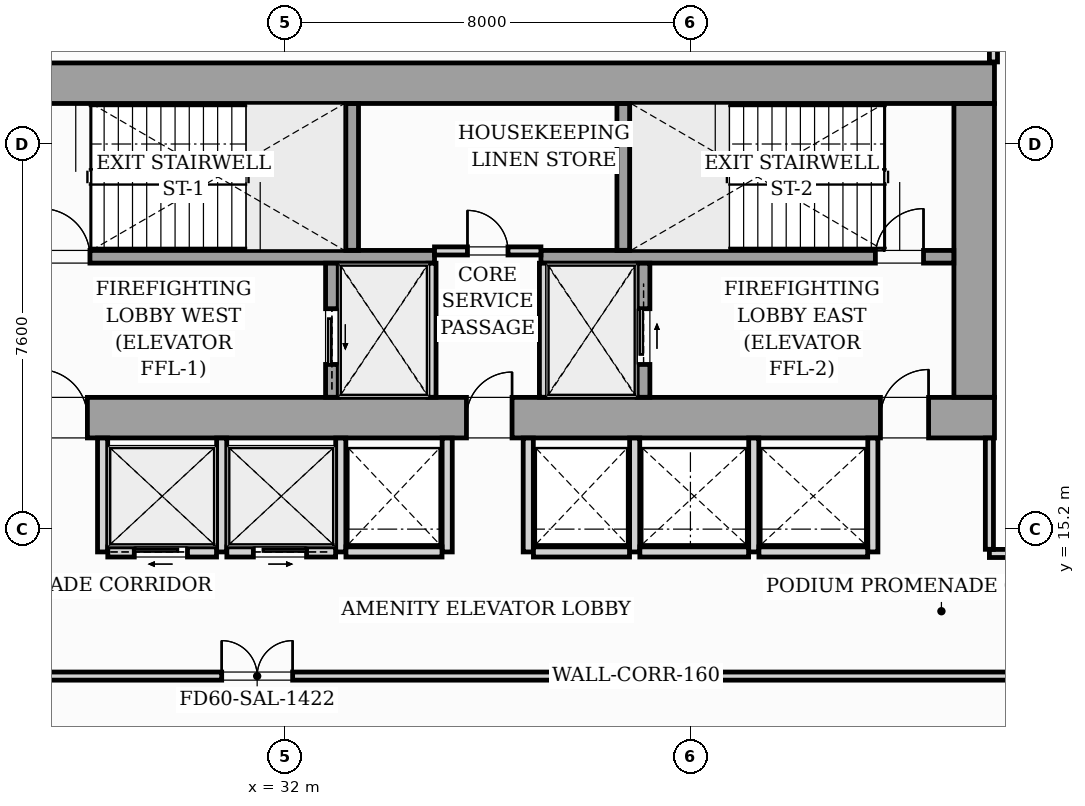
"""IFC4 building model, lengths in metres.
Left out: names, types, materials, properties, quantities, classifications, styles, units other than length and angle.
Written with IfcOpenShell. Run it as: python <this file> out.ifc"""

import sys

from ifc_helpers import new_model, si_unit, direction, frame, frame_2d, origin, origin_2d, place, context, subcontext, project, spatial, rectangle, i_section, extrude, source, transform, mapped, element, fill, save


model = new_model("IFC4")
c1 = context("Model", 3, precision=1e-05, world=origin(), true_north=direction((0.0, 1.0)))
c2 = subcontext(c1, "Body", "Model", "MODEL_VIEW")
j1 = project(units=[si_unit("LENGTHUNIT", "METRE"), si_unit("PLANEANGLEUNIT", "RADIAN")], contexts=[c1])
p1 = place(None, origin())
s1 = spatial("IfcSite", under=j1, at=p1, CompositionType="ELEMENT")
p2 = place(p1, origin())
s2 = spatial("IfcBuilding", under=s1, at=p2, CompositionType="ELEMENT")
p3 = place(p2, frame((0.0, 0.0, 9.5)))
s3 = spatial("IfcBuildingStorey", under=s2, at=p3, CompositionType="ELEMENT", Elevation=9.5)
m1 = source(origin(), c2, "Body", "SweptSolid", [
    extrude(i_section(OverallWidth=0.437, OverallDepth=0.514, WebThickness=0.061, FlangeThickness=0.097, FilletRadius=0.018, at=origin_2d()), origin(), (0.0, 0.0, 1.0), 4.496),
])
for number, where, z_axis, x_axis in (
    (1, (33.12, 17.4, 0.002), (0.0, 0.0, 1.0), (1.0, 0.0, 0.0)),
    (2, (38.88, 17.4, 0.002), (0.0, 0.0, 1.0), (1.0, 0.0, 0.0)),
    (3, (45.6, 17.4, 0.002), (0.0, 0.0, 1.0), (1.0, 0.0, 0.0)),
    (4, (33.12, 24.0, 0.002), (0.0, 0.0, 1.0), (1.0, 0.0, 0.0)),
    (5, (38.88, 24.0, 0.002), (0.0, 0.0, 1.0), (1.0, 0.0, 0.0)),
    (6, (45.6, 24.0, 0.002), (0.0, 0.0, 1.0), (1.0, 0.0, 0.0)),
):
    element("IfcColumn", number, at=place(p3, frame(where, z_axis=z_axis, x_axis=x_axis)), inside=s3, PredefinedType="PILASTER", context=c2, shape_type="MappedRepresentation", body=[
        mapped(m1, transform((0.0, 0.0, 0.0), scale=1.0)),
    ])
p4 = place(p3, frame((26.0, 17.4, 0.0), z_axis=(0.0, 0.0, 1.0), x_axis=(1.0, 0.0, 0.0)))
e7 = element("IfcWall", 7, at=p4, inside=s3, PredefinedType="SHEAR", context=c2, shape_type="SweptSolid", body=[
    extrude(rectangle(XDim=20.0, YDim=0.8, at=frame_2d((10.0, 0.0))), origin(), (0.0, 0.0, 1.0), 4.5),
])
p5 = place(p4, frame((1.15, 0.0, 0.0)))
e8 = element("IfcOpeningElement", 8, at=p5, cuts=e7, PredefinedType="OPENING", context=c2, shape_type="SweptSolid", body=[
    extrude(rectangle(XDim=0.95, YDim=2.06, at=frame_2d((0.475, 1.03))), frame((0.0, 0.41, 0.0), z_axis=(0.0, -1.0, 0.0), x_axis=(1.0, 0.0, 0.0)), (0.0, 0.0, 1.0), 0.82),
])
p6 = place(p4, frame((9.58, 0.0, 0.0)))
e9 = element("IfcOpeningElement", 9, at=p6, cuts=e7, PredefinedType="OPENING", context=c2, shape_type="SweptSolid", body=[
    extrude(rectangle(XDim=0.9, YDim=2.06, at=frame_2d((0.45, 1.03))), frame((0.0, 0.41, 0.0), z_axis=(0.0, -1.0, 0.0), x_axis=(1.0, 0.0, 0.0)), (0.0, 0.0, 1.0), 0.82),
])
p7 = place(p4, frame((17.75, 0.0, 0.0)))
e10 = element("IfcOpeningElement", 10, at=p7, cuts=e7, PredefinedType="OPENING", context=c2, shape_type="SweptSolid", body=[
    extrude(rectangle(XDim=0.95, YDim=2.06, at=frame_2d((0.475, 1.03))), frame((0.0, 0.41, 0.0), z_axis=(0.0, -1.0, 0.0), x_axis=(1.0, 0.0, 0.0)), (0.0, 0.0, 1.0), 0.82),
])
p8 = place(p3, frame((26.0, 24.0, 0.0), z_axis=(0.0, 0.0, 1.0), x_axis=(1.0, 0.0, 0.0)))
e11 = element("IfcWall", 11, at=p8, inside=s3, PredefinedType="SHEAR", context=c2, shape_type="SweptSolid", body=[
    extrude(rectangle(XDim=20.0, YDim=0.8, at=frame_2d((10.0, 0.0))), origin(), (0.0, 0.0, 1.0), 4.5),
])
p9 = place(p3, frame((45.6, 17.802, 0.0), z_axis=(0.0, 0.0, 1.0), x_axis=(0.0, 1.0, 0.0)))
e12 = element("IfcWall", 12, at=p9, inside=s3, PredefinedType="SHEAR", context=c2, shape_type="SweptSolid", body=[
    extrude(rectangle(XDim=5.796, YDim=0.8, at=frame_2d((2.898, 0.0))), origin(), (0.0, 0.0, 1.0), 4.5),
])
p10 = place(p3, frame((26.802, 20.575, 0.0), z_axis=(0.0, 0.0, 1.0), x_axis=(1.0, 0.0, 0.0)))
e13 = element("IfcWall", 13, at=p10, inside=s3, PredefinedType="SOLIDWALL", context=c2, shape_type="SweptSolid", body=[
    extrude(rectangle(XDim=8.148, YDim=0.25, at=frame_2d((4.074, 0.0))), origin(), (0.0, 0.0, 1.0), 4.5),
])
p11 = place(p10, frame((0.398, 0.0, 0.0)))
e14 = element("IfcOpeningElement", 14, at=p11, cuts=e13, PredefinedType="OPENING", context=c2, shape_type="SweptSolid", body=[
    extrude(rectangle(XDim=0.95, YDim=2.06, at=frame_2d((0.475, 1.03))), frame((0.0, 0.135, 0.0), z_axis=(0.0, -1.0, 0.0), x_axis=(1.0, 0.0, 0.0)), (0.0, 0.0, 1.0), 0.27),
])
p12 = place(p3, frame((37.05, 20.575, 0.0), z_axis=(0.0, 0.0, 1.0), x_axis=(1.0, 0.0, 0.0)))
e15 = element("IfcWall", 15, at=p12, inside=s3, PredefinedType="SOLIDWALL", context=c2, shape_type="SweptSolid", body=[
    extrude(rectangle(XDim=8.148, YDim=0.25, at=frame_2d((4.074, 0.0))), origin(), (0.0, 0.0, 1.0), 4.5),
])
p13 = place(p12, frame((6.6, 0.0, 0.0)))
e16 = element("IfcOpeningElement", 16, at=p13, cuts=e15, PredefinedType="OPENING", context=c2, shape_type="SweptSolid", body=[
    extrude(rectangle(XDim=0.95, YDim=2.06, at=frame_2d((0.475, 1.03))), frame((0.0, 0.135, 0.0), z_axis=(0.0, -1.0, 0.0), x_axis=(1.0, 0.0, 0.0)), (0.0, 0.0, 1.0), 0.27),
])
for number, where, z_axis, x_axis in (
    (17, (33.325, 20.702, 0.0), (0.0, 0.0, 1.0), (0.0, 1.0, 0.0)),
    (18, (38.675, 20.702, 0.0), (0.0, 0.0, 1.0), (0.0, 1.0, 0.0)),
):
    element("IfcWall", number, at=place(p3, frame(where, z_axis=z_axis, x_axis=x_axis)), inside=s3, PredefinedType="SOLIDWALL", context=c2, shape_type="SweptSolid", body=[
        extrude(rectangle(XDim=2.896, YDim=0.25, at=frame_2d((1.448, 0.0))), origin(), (0.0, 0.0, 1.0), 4.5),
    ])
p14 = place(p3, frame((32.925, 17.802, 0.0), z_axis=(0.0, 0.0, 1.0), x_axis=(0.0, 1.0, 0.0)))
e19 = element("IfcWall", 19, at=p14, inside=s3, PredefinedType="SOLIDWALL", context=c2, shape_type="SweptSolid", body=[
    extrude(rectangle(XDim=2.646, YDim=0.25, at=frame_2d((1.323, 0.0))), origin(), (0.0, 0.0, 1.0), 4.5),
])
p15 = place(p14, frame((0.648, 0.0, 0.0)))
e20 = element("IfcOpeningElement", 20, at=p15, cuts=e19, PredefinedType="OPENING", context=c2, shape_type="SweptSolid", body=[
    extrude(rectangle(XDim=1.1, YDim=2.08, at=frame_2d((0.55, 1.04))), frame((0.0, 0.135, 0.0), z_axis=(0.0, -1.0, 0.0), x_axis=(1.0, 0.0, 0.0)), (0.0, 0.0, 1.0), 0.27),
])
for number, where, z_axis, x_axis in (
    (21, (34.9, 17.802, 0.0), (0.0, 0.0, 1.0), (0.0, 1.0, 0.0)),
    (22, (37.1, 17.802, 0.0), (0.0, 0.0, 1.0), (0.0, 1.0, 0.0)),
):
    element("IfcWall", number, at=place(p3, frame(where, z_axis=z_axis, x_axis=x_axis)), inside=s3, PredefinedType="PARTITIONING", context=c2, shape_type="SweptSolid", body=[
        extrude(rectangle(XDim=2.646, YDim=0.16, at=frame_2d((1.323, 0.0))), origin(), (0.0, 0.0, 1.0), 4.08),
    ])
p16 = place(p3, frame((39.075, 17.802, 0.0), z_axis=(0.0, 0.0, 1.0), x_axis=(0.0, 1.0, 0.0)))
e23 = element("IfcWall", 23, at=p16, inside=s3, PredefinedType="SOLIDWALL", context=c2, shape_type="SweptSolid", body=[
    extrude(rectangle(XDim=2.646, YDim=0.25, at=frame_2d((1.323, 0.0))), origin(), (0.0, 0.0, 1.0), 4.5),
])
p17 = place(p16, frame((0.648, 0.0, 0.0)))
e24 = element("IfcOpeningElement", 24, at=p17, cuts=e23, PredefinedType="OPENING", context=c2, shape_type="SweptSolid", body=[
    extrude(rectangle(XDim=1.1, YDim=2.08, at=frame_2d((0.55, 1.04))), frame((0.0, 0.135, 0.0), z_axis=(0.0, -1.0, 0.0), x_axis=(1.0, 0.0, 0.0)), (0.0, 0.0, 1.0), 0.27),
])
p18 = place(p3, frame((34.95, 20.69, 0.0), z_axis=(0.0, 0.0, 1.0), x_axis=(1.0, 0.0, 0.0)))
e25 = element("IfcWall", 25, at=p18, inside=s3, PredefinedType="PARTITIONING", context=c2, shape_type="SweptSolid", body=[
    extrude(rectangle(XDim=2.1, YDim=0.16, at=frame_2d((1.05, 0.0))), origin(), (0.0, 0.0, 1.0), 4.08),
])
p19 = place(p18, frame((0.65, 0.0, 0.0)))
e26 = element("IfcOpeningElement", 26, at=p19, cuts=e25, PredefinedType="OPENING", context=c2, shape_type="SweptSolid", body=[
    extrude(rectangle(XDim=0.8, YDim=2.05, at=frame_2d((0.4, 1.025))), frame((0.0, 0.09, 0.0), z_axis=(0.0, -1.0, 0.0), x_axis=(1.0, 0.0, 0.0)), (0.0, 0.0, 1.0), 0.18),
])
for number, where, z_axis, x_axis in (
    (27, (28.4, 14.75, 0.0), (0.0, 0.0, 1.0), (0.0, 1.0, 0.0)),
    (28, (30.75, 14.75, 0.0), (0.0, 0.0, 1.0), (0.0, 1.0, 0.0)),
    (29, (33.1, 14.75, 0.0), (0.0, 0.0, 1.0), (0.0, 1.0, 0.0)),
):
    element("IfcWall", number, at=place(p3, frame(where, z_axis=z_axis, x_axis=x_axis)), inside=s3, PredefinedType="PARTITIONING", context=c2, shape_type="SweptSolid", body=[
        extrude(rectangle(XDim=2.248, YDim=0.2, at=frame_2d((1.124, 0.0))), origin(), (0.0, 0.0, 1.0), 4.08),
    ])
p20 = place(p3, frame((28.502, 14.75, 0.0), z_axis=(0.0, 0.0, 1.0), x_axis=(1.0, 0.0, 0.0)))
e30 = element("IfcWall", 30, at=p20, inside=s3, PredefinedType="PARTITIONING", context=c2, shape_type="SweptSolid", body=[
    extrude(rectangle(XDim=2.146, YDim=0.2, at=frame_2d((1.073, 0.0))), origin(), (0.0, 0.0, 1.0), 4.08),
])
p21 = place(p20, frame((0.523, 0.0, 0.0)))
e31 = element("IfcOpeningElement", 31, at=p21, cuts=e30, PredefinedType="OPENING", context=c2, shape_type="SweptSolid", body=[
    extrude(rectangle(XDim=1.05, YDim=2.08, at=frame_2d((0.525, 1.04))), frame((0.0, 0.11, 0.0), z_axis=(0.0, -1.0, 0.0), x_axis=(1.0, 0.0, 0.0)), (0.0, 0.0, 1.0), 0.22),
])
p22 = place(p3, frame((30.852, 14.75, 0.0), z_axis=(0.0, 0.0, 1.0), x_axis=(1.0, 0.0, 0.0)))
e32 = element("IfcWall", 32, at=p22, inside=s3, PredefinedType="PARTITIONING", context=c2, shape_type="SweptSolid", body=[
    extrude(rectangle(XDim=2.146, YDim=0.2, at=frame_2d((1.073, 0.0))), origin(), (0.0, 0.0, 1.0), 4.08),
])
p23 = place(p22, frame((0.523, 0.0, 0.0)))
e33 = element("IfcOpeningElement", 33, at=p23, cuts=e32, PredefinedType="OPENING", context=c2, shape_type="SweptSolid", body=[
    extrude(rectangle(XDim=1.05, YDim=2.08, at=frame_2d((0.525, 1.04))), frame((0.0, 0.11, 0.0), z_axis=(0.0, -1.0, 0.0), x_axis=(1.0, 0.0, 0.0)), (0.0, 0.0, 1.0), 0.22),
])
p24 = place(p3, frame((35.2, 14.75, 0.0), z_axis=(0.0, 0.0, 1.0), x_axis=(0.0, 1.0, 0.0)))
e34 = element("IfcWall", 34, at=p24, inside=s3, PredefinedType="PARTITIONING", context=c2, shape_type="SweptSolid", body=[
    extrude(rectangle(XDim=2.248, YDim=0.2, at=frame_2d((1.124, 0.0))), origin(), (0.0, 0.0, 1.0), 4.08),
])
p25 = place(p3, frame((33.202, 14.75, 0.0), z_axis=(0.0, 0.0, 1.0), x_axis=(1.0, 0.0, 0.0)))
e35 = element("IfcWall", 35, at=p25, inside=s3, PredefinedType="PARTITIONING", context=c2, shape_type="SweptSolid", body=[
    extrude(rectangle(XDim=1.896, YDim=0.2, at=frame_2d((0.948, 0.0))), origin(), (0.0, 0.0, 1.0), 4.08),
])
for number, where, z_axis, x_axis in (
    (36, (36.8, 14.75, 0.0), (0.0, 0.0, 1.0), (0.0, 1.0, 0.0)),
    (37, (38.9, 14.75, 0.0), (0.0, 0.0, 1.0), (0.0, 1.0, 0.0)),
):
    element("IfcWall", number, at=place(p3, frame(where, z_axis=z_axis, x_axis=x_axis)), inside=s3, PredefinedType="PARTITIONING", context=c2, shape_type="SweptSolid", body=[
        extrude(rectangle(XDim=2.248, YDim=0.2, at=frame_2d((1.124, 0.0))), origin(), (0.0, 0.0, 1.0), 4.08),
    ])
p26 = place(p3, frame((36.902, 14.75, 0.0), z_axis=(0.0, 0.0, 1.0), x_axis=(1.0, 0.0, 0.0)))
e38 = element("IfcWall", 38, at=p26, inside=s3, PredefinedType="PARTITIONING", context=c2, shape_type="SweptSolid", body=[
    extrude(rectangle(XDim=1.896, YDim=0.2, at=frame_2d((0.948, 0.0))), origin(), (0.0, 0.0, 1.0), 4.08),
])
for number, where, z_axis, x_axis in (
    (39, (41.25, 14.75, 0.0), (0.0, 0.0, 1.0), (0.0, 1.0, 0.0)),
    (40, (43.6, 14.75, 0.0), (0.0, 0.0, 1.0), (0.0, 1.0, 0.0)),
):
    element("IfcWall", number, at=place(p3, frame(where, z_axis=z_axis, x_axis=x_axis)), inside=s3, PredefinedType="PARTITIONING", context=c2, shape_type="SweptSolid", body=[
        extrude(rectangle(XDim=2.248, YDim=0.2, at=frame_2d((1.124, 0.0))), origin(), (0.0, 0.0, 1.0), 4.08),
    ])
for number, where, z_axis, x_axis in (
    (41, (39.002, 14.75, 0.0), (0.0, 0.0, 1.0), (1.0, 0.0, 0.0)),
    (42, (41.352, 14.75, 0.0), (0.0, 0.0, 1.0), (1.0, 0.0, 0.0)),
):
    element("IfcWall", number, at=place(p3, frame(where, z_axis=z_axis, x_axis=x_axis)), inside=s3, PredefinedType="PARTITIONING", context=c2, shape_type="SweptSolid", body=[
        extrude(rectangle(XDim=2.146, YDim=0.2, at=frame_2d((1.073, 0.0))), origin(), (0.0, 0.0, 1.0), 4.08),
    ])
p27 = place(p3, frame((2.75, 12.3, 0.0), z_axis=(0.0, 0.0, 1.0), x_axis=(1.0, 0.0, 0.0)))
e43 = element("IfcWall", 43, at=p27, inside=s3, PredefinedType="PARTITIONING", context=c2, shape_type="SweptSolid", body=[
    extrude(rectangle(XDim=72.348, YDim=0.16, at=frame_2d((36.174, 0.0))), origin(), (0.0, 0.0, 1.0), 4.08),
])
p28 = place(p27, frame((6.5, 0.0, 0.0)))
e44 = element("IfcOpeningElement", 44, at=p28, cuts=e43, PredefinedType="OPENING", context=c2, shape_type="SweptSolid", body=[
    extrude(rectangle(XDim=1.4, YDim=2.08, at=frame_2d((0.7, 1.04))), frame((0.0, 0.09, 0.0), z_axis=(0.0, -1.0, 0.0), x_axis=(1.0, 0.0, 0.0)), (0.0, 0.0, 1.0), 0.18),
])
p29 = place(p27, frame((28.0, 0.0, 0.0)))
e45 = element("IfcOpeningElement", 45, at=p29, cuts=e43, PredefinedType="OPENING", context=c2, shape_type="SweptSolid", body=[
    extrude(rectangle(XDim=1.4, YDim=2.08, at=frame_2d((0.7, 1.04))), frame((0.0, 0.09, 0.0), z_axis=(0.0, -1.0, 0.0), x_axis=(1.0, 0.0, 0.0)), (0.0, 0.0, 1.0), 0.18),
])
p30 = place(p3, frame((45.9, 14.72, 0.0), z_axis=(0.0, 0.0, 1.0), x_axis=(1.0, 0.0, 0.0)))
e46 = element("IfcWall", 46, at=p30, inside=s3, PredefinedType="PARTITIONING", context=c2, shape_type="SweptSolid", body=[
    extrude(rectangle(XDim=29.198, YDim=0.16, at=frame_2d((14.599, 0.0))), origin(), (0.0, 0.0, 1.0), 4.08),
])
p31 = place(p30, frame((5.0, 0.0, 0.0)))
e47 = element("IfcOpeningElement", 47, at=p31, cuts=e46, PredefinedType="OPENING", context=c2, shape_type="SweptSolid", body=[
    extrude(rectangle(XDim=1.4, YDim=2.08, at=frame_2d((0.7, 1.04))), frame((0.0, 0.09, 0.0), z_axis=(0.0, -1.0, 0.0), x_axis=(1.0, 0.0, 0.0)), (0.0, 0.0, 1.0), 0.18),
])
p32 = place(p3, frame((45.98, 24.42, 0.0), z_axis=(0.0, 0.0, 1.0), x_axis=(0.0, 1.0, 0.0)))
e48 = element("IfcWall", 48, at=p32, inside=s3, PredefinedType="PARTITIONING", context=c2, shape_type="SweptSolid", body=[
    extrude(rectangle(XDim=9.83, YDim=0.16, at=frame_2d((4.915, 0.0))), origin(), (0.0, 0.0, 1.0), 4.08),
])
p33 = place(p3, frame((45.9, 14.802, 0.0), z_axis=(0.0, 0.0, 1.0), x_axis=(0.0, 1.0, 0.0)))
e49 = element("IfcWall", 49, at=p33, inside=s3, PredefinedType="PARTITIONING", context=c2, shape_type="SweptSolid", body=[
    extrude(rectangle(XDim=2.196, YDim=0.16, at=frame_2d((1.098, 0.0))), origin(), (0.0, 0.0, 1.0), 4.08),
])
m2 = source(origin(), c2, "Body", "SweptSolid", [
    extrude(rectangle(XDim=0.95, YDim=2.06, at=frame_2d((0.475, 1.03))), frame((0.0, 0.025, 0.0), z_axis=(0.0, -1.0, 0.0), x_axis=(1.0, 0.0, 0.0)), (0.0, 0.0, 1.0), 0.05),
])
p34 = place(p5, origin())
e50 = element("IfcDoor", 50, at=p34, inside=s3, OperationType="SINGLE_SWING_LEFT", PredefinedType="DOOR", context=c2, shape_type="MappedRepresentation", body=[
    mapped(m2, transform((0.0, 0.0, 0.0), scale=1.0)),
])
fill(e8, e50)
m3 = source(origin(), c2, "Body", "SweptSolid", [
    extrude(rectangle(XDim=0.9, YDim=2.06, at=frame_2d((0.45, 1.03))), frame((0.0, 0.025, 0.0), z_axis=(0.0, -1.0, 0.0), x_axis=(1.0, 0.0, 0.0)), (0.0, 0.0, 1.0), 0.05),
])
p35 = place(p6, origin())
e51 = element("IfcDoor", 51, at=p35, inside=s3, OperationType="SINGLE_SWING_RIGHT", PredefinedType="DOOR", context=c2, shape_type="MappedRepresentation", body=[
    mapped(m3, transform((0.0, 0.0, 0.0), scale=1.0)),
])
fill(e9, e51)
p36 = place(p7, origin())
e52 = element("IfcDoor", 52, at=p36, inside=s3, OperationType="SINGLE_SWING_RIGHT", PredefinedType="DOOR", context=c2, shape_type="MappedRepresentation", body=[
    mapped(m2, transform((0.0, 0.0, 0.0), scale=1.0)),
])
fill(e10, e52)
p37 = place(p11, origin())
e53 = element("IfcDoor", 53, at=p37, inside=s3, OperationType="SINGLE_SWING_LEFT", PredefinedType="DOOR", context=c2, shape_type="MappedRepresentation", body=[
    mapped(m2, transform((0.0, 0.0, 0.0), scale=1.0)),
])
fill(e14, e53)
p38 = place(p13, origin())
e54 = element("IfcDoor", 54, at=p38, inside=s3, OperationType="SINGLE_SWING_RIGHT", PredefinedType="DOOR", context=c2, shape_type="MappedRepresentation", body=[
    mapped(m2, transform((0.0, 0.0, 0.0), scale=1.0)),
])
fill(e16, e54)
m4 = source(origin(), c2, "Body", "SweptSolid", [
    extrude(rectangle(XDim=1.1, YDim=2.08, at=frame_2d((0.55, 1.04))), frame((0.0, 0.025, 0.0), z_axis=(0.0, -1.0, 0.0), x_axis=(1.0, 0.0, 0.0)), (0.0, 0.0, 1.0), 0.05),
])
p39 = place(p15, origin())
e55 = element("IfcDoor", 55, at=p39, inside=s3, OperationType="SLIDING_TO_LEFT", PredefinedType="DOOR", context=c2, shape_type="MappedRepresentation", body=[
    mapped(m4, transform((0.0, 0.0, 0.0), scale=1.0)),
])
fill(e20, e55)
p40 = place(p17, origin())
e56 = element("IfcDoor", 56, at=p40, inside=s3, OperationType="SLIDING_TO_RIGHT", PredefinedType="DOOR", context=c2, shape_type="MappedRepresentation", body=[
    mapped(m4, transform((0.0, 0.0, 0.0), scale=1.0)),
])
fill(e24, e56)
m5 = source(origin(), c2, "Body", "SweptSolid", [
    extrude(rectangle(XDim=0.8, YDim=2.05, at=frame_2d((0.4, 1.025))), frame((0.0, 0.025, 0.0), z_axis=(0.0, -1.0, 0.0), x_axis=(1.0, 0.0, 0.0)), (0.0, 0.0, 1.0), 0.05),
])
p41 = place(p19, origin())
e57 = element("IfcDoor", 57, at=p41, inside=s3, OperationType="SINGLE_SWING_LEFT", PredefinedType="DOOR", context=c2, shape_type="MappedRepresentation", body=[
    mapped(m5, transform((0.0, 0.0, 0.0), scale=1.0)),
])
fill(e26, e57)
m6 = source(origin(), c2, "Body", "SweptSolid", [
    extrude(rectangle(XDim=1.05, YDim=2.08, at=frame_2d((0.525, 1.04))), frame((0.0, 0.025, 0.0), z_axis=(0.0, -1.0, 0.0), x_axis=(1.0, 0.0, 0.0)), (0.0, 0.0, 1.0), 0.05),
])
p42 = place(p21, origin())
e58 = element("IfcDoor", 58, at=p42, inside=s3, OperationType="SLIDING_TO_LEFT", PredefinedType="DOOR", context=c2, shape_type="MappedRepresentation", body=[
    mapped(m6, transform((0.0, 0.0, 0.0), scale=1.0)),
])
fill(e31, e58)
p43 = place(p23, origin())
e59 = element("IfcDoor", 59, at=p43, inside=s3, OperationType="SLIDING_TO_RIGHT", PredefinedType="DOOR", context=c2, shape_type="MappedRepresentation", body=[
    mapped(m6, transform((0.0, 0.0, 0.0), scale=1.0)),
])
fill(e33, e59)
m7 = source(origin(), c2, "Body", "SweptSolid", [
    extrude(rectangle(XDim=1.4, YDim=2.08, at=frame_2d((0.7, 1.04))), frame((0.0, 0.025, 0.0), z_axis=(0.0, -1.0, 0.0), x_axis=(1.0, 0.0, 0.0)), (0.0, 0.0, 1.0), 0.05),
])
p44 = place(p29, origin())
e60 = element("IfcDoor", 60, at=p44, inside=s3, OperationType="DOUBLE_DOOR_SINGLE_SWING", PredefinedType="DOOR", context=c2, shape_type="MappedRepresentation", body=[
    mapped(m7, transform((0.0, 0.0, 0.0), scale=1.0)),
])
fill(e45, e60)
save(model, sys.argv[1])
